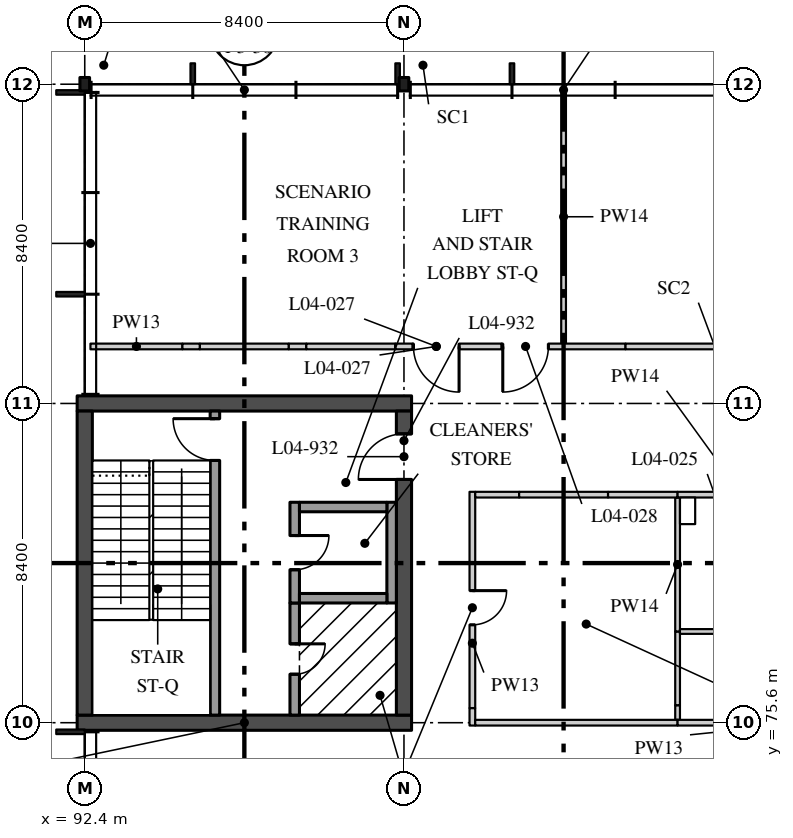
"""IFC4 building model, lengths in metres.
Left out: names, types, materials, properties, quantities, classifications, styles, units other than length and angle.
Written with IfcOpenShell. Run it as: python <this file> out.ifc"""

import sys

from ifc_helpers import new_model, si_unit, direction, frame, frame_2d, origin, origin_2d, place, context, subcontext, project, spatial, rectangle, i_section, extrude, element, fill, save


model = new_model("IFC4")
c1 = context("Model", 3, precision=1e-05, world=origin(), true_north=direction((0.0, 1.0)))
c2 = subcontext(c1, "Body", "Model", "MODEL_VIEW")
j1 = project(units=[si_unit("LENGTHUNIT", "METRE"), si_unit("PLANEANGLEUNIT", "RADIAN")], contexts=[c1])
p1 = place(None, origin())
s1 = spatial("IfcSite", under=j1, at=p1, CompositionType="ELEMENT")
p2 = place(p1, origin())
s2 = spatial("IfcBuilding", under=s1, at=p2, CompositionType="ELEMENT")
p3 = place(p2, frame((0.0, 0.0, 18.9)))
s3 = spatial("IfcBuildingStorey", under=s2, at=p3, CompositionType="ELEMENT", Elevation=18.9)
for number, where, z_axis, x_axis in (
    (1, (92.4, 92.4, 0.0), (0.0, 0.0, 1.0), (1.0, 0.0, 0.0)),
    (2, (100.8, 92.4, 0.0), (0.0, 0.0, 1.0), (1.0, 0.0, 0.0)),
):
    element("IfcColumn", number, at=place(p3, frame(where, z_axis=z_axis, x_axis=x_axis)), inside=s3, PredefinedType="COLUMN", context=c2, shape_type="SweptSolid", body=[
        extrude(i_section(OverallWidth=0.254, OverallDepth=0.353, WebThickness=0.01, FlangeThickness=0.016, FilletRadius=0.015, at=origin_2d()), origin(), (0.0, 0.0, 1.0), 4.37),
    ])
for number, where, z_axis, x_axis in (
    (3, (92.2, 75.6, 0.0), (0.0, 0.0, 1.0), (1.0, 0.0, 0.0)),
    (4, (92.2, 84.0, 0.0), (0.0, 0.0, 1.0), (1.0, 0.0, 0.0)),
):
    element("IfcWall", number, at=place(p3, frame(where, z_axis=z_axis, x_axis=x_axis)), inside=s3, PredefinedType="SHEAR", context=c2, shape_type="SweptSolid", body=[
        extrude(rectangle(XDim=8.8, YDim=0.4, at=frame_2d((4.4, 0.0))), origin(), (0.0, 0.0, 1.0), 4.37),
    ])
p4 = place(p3, frame((92.4, 75.8, 0.0), z_axis=(0.0, 0.0, 1.0), x_axis=(0.0, 1.0, 0.0)))
e5 = element("IfcWall", 5, at=p4, inside=s3, PredefinedType="SHEAR", context=c2, shape_type="SweptSolid", body=[
    extrude(rectangle(XDim=8.0, YDim=0.4, at=frame_2d((4.0, 0.0))), origin(), (0.0, 0.0, 1.0), 4.37),
])
p5 = place(p3, frame((100.8, 75.8, 0.0), z_axis=(0.0, 0.0, 1.0), x_axis=(0.0, 1.0, 0.0)))
e6 = element("IfcWall", 6, at=p5, inside=s3, PredefinedType="SHEAR", context=c2, shape_type="SweptSolid", body=[
    extrude(rectangle(XDim=8.0, YDim=0.4, at=frame_2d((4.0, 0.0))), origin(), (0.0, 0.0, 1.0), 4.37),
])
p6 = place(p5, frame((6.2, 0.0, 0.0)))
e7 = element("IfcOpeningElement", 7, at=p6, cuts=e6, PredefinedType="OPENING", context=c2, shape_type="SweptSolid", body=[
    extrude(rectangle(XDim=1.2, YDim=2.1, at=frame_2d((0.6, 1.05))), frame((0.0, 0.21, 0.0), z_axis=(0.0, -1.0, 0.0), x_axis=(1.0, 0.0, 0.0)), (0.0, 0.0, 1.0), 0.42),
])
p7 = place(p3, frame((95.825, 83.8, 0.0), z_axis=(0.0, 0.0, 1.0), x_axis=(0.0, -1.0, 0.0)))
e8 = element("IfcWall", 8, at=p7, inside=s3, PredefinedType="SOLIDWALL", context=c2, shape_type="SweptSolid", body=[
    extrude(rectangle(XDim=8.0, YDim=0.25, at=frame_2d((4.0, 0.0))), origin(), (0.0, 0.0, 1.0), 4.37),
])
p8 = place(p7, frame((0.2, 0.0, 0.0)))
e9 = element("IfcOpeningElement", 9, at=p8, cuts=e8, PredefinedType="OPENING", context=c2, shape_type="SweptSolid", body=[
    extrude(rectangle(XDim=1.1, YDim=2.1, at=frame_2d((0.55, 1.05))), frame((0.0, 0.135, 0.0), z_axis=(0.0, -1.0, 0.0), x_axis=(1.0, 0.0, 0.0)), (0.0, 0.0, 1.0), 0.27),
])
p9 = place(p3, frame((97.925, 78.75, 0.0), z_axis=(0.0, 0.0, 1.0), x_axis=(0.0, -1.0, 0.0)))
e10 = element("IfcWall", 10, at=p9, inside=s3, PredefinedType="SOLIDWALL", context=c2, shape_type="SweptSolid", body=[
    extrude(rectangle(XDim=2.95, YDim=0.25, at=frame_2d((1.475, 0.0))), origin(), (0.0, 0.0, 1.0), 4.37),
])
p10 = place(p9, frame((1.075, 0.0, 0.0)))
e11 = element("IfcOpeningElement", 11, at=p10, cuts=e10, PredefinedType="OPENING", context=c2, shape_type="SweptSolid", body=[
    extrude(rectangle(XDim=0.8, YDim=2.1, at=frame_2d((0.4, 1.05))), frame((0.0, 0.135, 0.0), z_axis=(0.0, -1.0, 0.0), x_axis=(1.0, 0.0, 0.0)), (0.0, 0.0, 1.0), 0.27),
])
p11 = place(p3, frame((97.925, 81.4, 0.0), z_axis=(0.0, 0.0, 1.0), x_axis=(0.0, -1.0, 0.0)))
e12 = element("IfcWall", 12, at=p11, inside=s3, PredefinedType="SOLIDWALL", context=c2, shape_type="SweptSolid", body=[
    extrude(rectangle(XDim=2.65, YDim=0.25, at=frame_2d((1.325, 0.0))), origin(), (0.0, 0.0, 1.0), 4.37),
])
p12 = place(p11, frame((0.875, 0.0, 0.0)))
e13 = element("IfcOpeningElement", 13, at=p12, cuts=e12, PredefinedType="OPENING", context=c2, shape_type="SweptSolid", body=[
    extrude(rectangle(XDim=0.9, YDim=2.1, at=frame_2d((0.45, 1.05))), frame((0.0, 0.135, 0.0), z_axis=(0.0, -1.0, 0.0), x_axis=(1.0, 0.0, 0.0)), (0.0, 0.0, 1.0), 0.27),
])
p13 = place(p3, frame((100.475, 81.4, 0.0), z_axis=(0.0, 0.0, 1.0), x_axis=(0.0, -1.0, 0.0)))
e14 = element("IfcWall", 14, at=p13, inside=s3, PredefinedType="SOLIDWALL", context=c2, shape_type="SweptSolid", body=[
    extrude(rectangle(XDim=2.65, YDim=0.25, at=frame_2d((1.325, 0.0))), origin(), (0.0, 0.0, 1.0), 4.37),
])
for number, where, z_axis, x_axis in (
    (15, (98.05, 81.275, 0.0), (0.0, 0.0, 1.0), (1.0, 0.0, 0.0)),
    (16, (98.05, 78.875, 0.0), (0.0, 0.0, 1.0), (1.0, 0.0, 0.0)),
):
    element("IfcWall", number, at=place(p3, frame(where, z_axis=z_axis, x_axis=x_axis)), inside=s3, PredefinedType="SOLIDWALL", context=c2, shape_type="SweptSolid", body=[
        extrude(rectangle(XDim=2.3, YDim=0.25, at=frame_2d((1.15, 0.0))), origin(), (0.0, 0.0, 1.0), 4.37),
    ])
p14 = place(p3, frame((108.0, 75.675, 0.0), z_axis=(0.0, 0.0, 1.0), x_axis=(0.0, 1.0, 0.0)))
e17 = element("IfcWall", 17, at=p14, inside=s3, PredefinedType="PARTITIONING", context=c2, shape_type="SweptSolid", body=[
    extrude(rectangle(XDim=0.385, YDim=0.125, at=frame_2d((0.192, 0.0))), origin(), (0.0, 0.0, 1.0), 3.819),
])
p15 = place(p3, frame((108.0, 76.06, 0.0), z_axis=(0.0, 0.0, 1.0), x_axis=(0.0, 1.0, 0.0)))
e18 = element("IfcWall", 18, at=p15, inside=s3, PredefinedType="PARTITIONING", context=c2, shape_type="SweptSolid", body=[
    extrude(rectangle(XDim=1.94, YDim=0.125, at=frame_2d((0.97, 0.0))), origin(), (0.0, 0.0, 1.0), 4.37),
])
p16 = place(p3, frame((108.0, 78.0, 0.0), z_axis=(0.0, 0.0, 1.0), x_axis=(0.0, 1.0, 0.0)))
e19 = element("IfcWall", 19, at=p16, inside=s3, PredefinedType="PARTITIONING", context=c2, shape_type="SweptSolid", body=[
    extrude(rectangle(XDim=3.525, YDim=0.125, at=frame_2d((1.762, 0.0))), origin(), (0.0, 0.0, 1.0), 4.37),
])
p17 = place(p3, frame((102.6, 75.525, 0.0), z_axis=(0.0, 0.0, 1.0), x_axis=(0.0, 1.0, 0.0)))
e20 = element("IfcWall", 20, at=p17, inside=s3, PredefinedType="PARTITIONING", context=c2, shape_type="SweptSolid", body=[
    extrude(rectangle(XDim=0.46, YDim=0.15, at=frame_2d((0.23, 0.0))), origin(), (0.0, 0.0, 1.0), 3.819),
])
p18 = place(p3, frame((102.6, 75.985, 0.0), z_axis=(0.0, 0.0, 1.0), x_axis=(0.0, 1.0, 0.0)))
e21 = element("IfcWall", 21, at=p18, inside=s3, PredefinedType="PARTITIONING", context=c2, shape_type="SweptSolid", body=[
    extrude(rectangle(XDim=5.69, YDim=0.15, at=frame_2d((2.845, 0.0))), origin(), (0.0, 0.0, 1.0), 4.37),
])
p19 = place(p18, frame((2.19, 0.0, 0.0)))
e22 = element("IfcOpeningElement", 22, at=p19, cuts=e21, PredefinedType="OPENING", context=c2, shape_type="SweptSolid", body=[
    extrude(rectangle(XDim=0.9, YDim=2.1, at=frame_2d((0.45, 1.05))), frame((0.0, 0.085, 0.0), z_axis=(0.0, -1.0, 0.0), x_axis=(1.0, 0.0, 0.0)), (0.0, 0.0, 1.0), 0.17),
])
p20 = place(p3, frame((102.675, 75.6, 0.0), z_axis=(0.0, 0.0, 1.0), x_axis=(1.0, 0.0, 0.0)))
e23 = element("IfcWall", 23, at=p20, inside=s3, PredefinedType="PARTITIONING", context=c2, shape_type="SweptSolid", body=[
    extrude(rectangle(XDim=5.325, YDim=0.15, at=frame_2d((2.663, 0.0))), origin(), (0.0, 0.0, 1.0), 3.819),
])
p21 = place(p3, frame((102.675, 81.6, 0.0), z_axis=(0.0, 0.0, 1.0), x_axis=(1.0, 0.0, 0.0)))
e24 = element("IfcWall", 24, at=p21, inside=s3, PredefinedType="PARTITIONING", context=c2, shape_type="SweptSolid", body=[
    extrude(rectangle(XDim=1.155, YDim=0.15, at=frame_2d((0.578, 0.0))), origin(), (0.0, 0.0, 1.0), 3.946),
])
p22 = place(p3, frame((103.83, 81.6, 0.0), z_axis=(0.0, 0.0, 1.0), x_axis=(1.0, 0.0, 0.0)))
e25 = element("IfcWall", 25, at=p22, inside=s3, PredefinedType="PARTITIONING", context=c2, shape_type="SweptSolid", body=[
    extrude(rectangle(XDim=2.34, YDim=0.15, at=frame_2d((1.17, 0.0))), origin(), (0.0, 0.0, 1.0), 4.37),
])
p23 = place(p3, frame((106.17, 81.6, 0.0), z_axis=(0.0, 0.0, 1.0), x_axis=(1.0, 0.0, 0.0)))
e26 = element("IfcWall", 26, at=p23, inside=s3, PredefinedType="PARTITIONING", context=c2, shape_type="SweptSolid", body=[
    extrude(rectangle(XDim=1.83, YDim=0.15, at=frame_2d((0.915, 0.0))), origin(), (0.0, 0.0, 1.0), 3.946),
])
p24 = place(p3, frame((108.062, 78.0, 0.0), z_axis=(0.0, 0.0, 1.0), x_axis=(1.0, 0.0, 0.0)))
e27 = element("IfcWall", 27, at=p24, inside=s3, PredefinedType="PARTITIONING", context=c2, shape_type="SweptSolid", body=[
    extrude(rectangle(XDim=1.33, YDim=0.125, at=frame_2d((0.665, 0.0))), origin(), (0.0, 0.0, 1.0), 3.819),
])
p25 = place(p3, frame((108.0, 75.6, 0.0), z_axis=(0.0, 0.0, 1.0), x_axis=(1.0, 0.0, 0.0)))
e28 = element("IfcWall", 28, at=p25, inside=s3, PredefinedType="PARTITIONING", context=c2, shape_type="SweptSolid", body=[
    extrude(rectangle(XDim=1.072, YDim=0.15, at=frame_2d((0.536, 0.0))), origin(), (0.0, 0.0, 1.0), 3.819),
])
p26 = place(p3, frame((108.0, 81.6, 0.0), z_axis=(0.0, 0.0, 1.0), x_axis=(1.0, 0.0, 0.0)))
e29 = element("IfcWall", 29, at=p26, inside=s3, PredefinedType="PARTITIONING", context=c2, shape_type="SweptSolid", body=[
    extrude(rectangle(XDim=1.43, YDim=0.15, at=frame_2d((0.715, 0.0))), origin(), (0.0, 0.0, 1.0), 3.819),
])
p27 = place(p3, frame((105.0, 85.575, 0.0), z_axis=(0.0, 0.0, 1.0), x_axis=(0.0, 1.0, 0.0)))
e30 = element("IfcWall", 30, at=p27, inside=s3, PredefinedType="PARTITIONING", context=c2, shape_type="SweptSolid", body=[
    extrude(rectangle(XDim=6.675, YDim=0.125, at=frame_2d((3.337, 0.0))), origin(), (0.0, 0.0, 1.0), 4.37),
])
p28 = place(p3, frame((92.55, 85.5, 0.0), z_axis=(0.0, 0.0, 1.0), x_axis=(1.0, 0.0, 0.0)))
e31 = element("IfcWall", 31, at=p28, inside=s3, PredefinedType="PARTITIONING", context=c2, shape_type="SweptSolid", body=[
    extrude(rectangle(XDim=2.42, YDim=0.15, at=frame_2d((1.21, 0.0))), origin(), (0.0, 0.0, 1.0), 4.37),
])
p29 = place(p3, frame((94.97, 85.5, 0.0), z_axis=(0.0, 0.0, 1.0), x_axis=(1.0, 0.0, 0.0)))
e32 = element("IfcWall", 32, at=p29, inside=s3, PredefinedType="PARTITIONING", context=c2, shape_type="SweptSolid", body=[
    extrude(rectangle(XDim=0.46, YDim=0.15, at=frame_2d((0.23, 0.0))), origin(), (0.0, 0.0, 1.0), 3.946),
])
p30 = place(p3, frame((95.43, 85.5, 0.0), z_axis=(0.0, 0.0, 1.0), x_axis=(1.0, 0.0, 0.0)))
e33 = element("IfcWall", 33, at=p30, inside=s3, PredefinedType="PARTITIONING", context=c2, shape_type="SweptSolid", body=[
    extrude(rectangle(XDim=2.34, YDim=0.15, at=frame_2d((1.17, 0.0))), origin(), (0.0, 0.0, 1.0), 4.37),
])
p31 = place(p3, frame((97.77, 85.5, 0.0), z_axis=(0.0, 0.0, 1.0), x_axis=(1.0, 0.0, 0.0)))
e34 = element("IfcWall", 34, at=p31, inside=s3, PredefinedType="PARTITIONING", context=c2, shape_type="SweptSolid", body=[
    extrude(rectangle(XDim=0.46, YDim=0.15, at=frame_2d((0.23, 0.0))), origin(), (0.0, 0.0, 1.0), 3.946),
])
p32 = place(p3, frame((98.23, 85.5, 0.0), z_axis=(0.0, 0.0, 1.0), x_axis=(1.0, 0.0, 0.0)))
e35 = element("IfcWall", 35, at=p32, inside=s3, PredefinedType="PARTITIONING", context=c2, shape_type="SweptSolid", body=[
    extrude(rectangle(XDim=2.34, YDim=0.15, at=frame_2d((1.17, 0.0))), origin(), (0.0, 0.0, 1.0), 4.37),
])
p33 = place(p3, frame((100.57, 85.5, 0.0), z_axis=(0.0, 0.0, 1.0), x_axis=(1.0, 0.0, 0.0)))
e36 = element("IfcWall", 36, at=p33, inside=s3, PredefinedType="PARTITIONING", context=c2, shape_type="SweptSolid", body=[
    extrude(rectangle(XDim=0.46, YDim=0.15, at=frame_2d((0.23, 0.0))), origin(), (0.0, 0.0, 1.0), 3.819),
])
p34 = place(p3, frame((101.03, 85.5, 0.0), z_axis=(0.0, 0.0, 1.0), x_axis=(1.0, 0.0, 0.0)))
e37 = element("IfcWall", 37, at=p34, inside=s3, PredefinedType="PARTITIONING", context=c2, shape_type="SweptSolid", body=[
    extrude(rectangle(XDim=2.34, YDim=0.15, at=frame_2d((1.17, 0.0))), origin(), (0.0, 0.0, 1.0), 4.37),
])
p35 = place(p34, frame((0.02, 0.0, 0.0)))
e38 = element("IfcOpeningElement", 38, at=p35, cuts=e37, PredefinedType="OPENING", context=c2, shape_type="SweptSolid", body=[
    extrude(rectangle(XDim=1.2, YDim=2.4, at=frame_2d((0.6, 1.2))), frame((0.0, 0.085, 0.0), z_axis=(0.0, -1.0, 0.0), x_axis=(1.0, 0.0, 0.0)), (0.0, 0.0, 1.0), 0.17),
])
p36 = place(p3, frame((103.37, 85.5, 0.0), z_axis=(0.0, 0.0, 1.0), x_axis=(1.0, 0.0, 0.0)))
e39 = element("IfcWall", 39, at=p36, inside=s3, PredefinedType="PARTITIONING", context=c2, shape_type="SweptSolid", body=[
    extrude(rectangle(XDim=1.63, YDim=0.15, at=frame_2d((0.815, 0.0))), origin(), (0.0, 0.0, 1.0), 3.946),
])
p37 = place(p36, frame((0.03, 0.0, 0.0)))
e40 = element("IfcOpeningElement", 40, at=p37, cuts=e39, PredefinedType="OPENING", context=c2, shape_type="SweptSolid", body=[
    extrude(rectangle(XDim=1.2, YDim=2.4, at=frame_2d((0.6, 1.2))), frame((0.0, 0.085, 0.0), z_axis=(0.0, -1.0, 0.0), x_axis=(1.0, 0.0, 0.0)), (0.0, 0.0, 1.0), 0.17),
])
p38 = place(p3, frame((105.0, 85.5, 0.0), z_axis=(0.0, 0.0, 1.0), x_axis=(1.0, 0.0, 0.0)))
e41 = element("IfcWall", 41, at=p38, inside=s3, PredefinedType="PARTITIONING", context=c2, shape_type="SweptSolid", body=[
    extrude(rectangle(XDim=1.63, YDim=0.15, at=frame_2d((0.815, 0.0))), origin(), (0.0, 0.0, 1.0), 3.946),
])
p39 = place(p3, frame((106.63, 85.5, 0.0), z_axis=(0.0, 0.0, 1.0), x_axis=(1.0, 0.0, 0.0)))
e42 = element("IfcWall", 42, at=p39, inside=s3, PredefinedType="PARTITIONING", context=c2, shape_type="SweptSolid", body=[
    extrude(rectangle(XDim=2.34, YDim=0.15, at=frame_2d((1.17, 0.0))), origin(), (0.0, 0.0, 1.0), 4.37),
])
p40 = place(p6, origin())
e43 = element("IfcDoor", 43, at=p40, inside=s3, OperationType="SINGLE_SWING_RIGHT", PredefinedType="DOOR", context=c2, shape_type="SweptSolid", body=[
    extrude(rectangle(XDim=1.2, YDim=2.1, at=frame_2d((0.6, 1.05))), frame((0.0, 0.035, 0.0), z_axis=(0.0, -1.0, 0.0), x_axis=(1.0, 0.0, 0.0)), (0.0, 0.0, 1.0), 0.07),
])
fill(e7, e43)
p41 = place(p12, origin())
e44 = element("IfcDoor", 44, at=p41, inside=s3, OperationType="SINGLE_SWING_RIGHT", PredefinedType="DOOR", context=c2, shape_type="SweptSolid", body=[
    extrude(rectangle(XDim=0.9, YDim=2.1, at=frame_2d((0.45, 1.05))), frame((0.0, 0.035, 0.0), z_axis=(0.0, -1.0, 0.0), x_axis=(1.0, 0.0, 0.0)), (0.0, 0.0, 1.0), 0.07),
])
fill(e13, e44)
p42 = place(p10, origin())
e45 = element("IfcDoor", 45, at=p42, inside=s3, OperationType="SINGLE_SWING_RIGHT", PredefinedType="DOOR", context=c2, shape_type="SweptSolid", body=[
    extrude(rectangle(XDim=0.8, YDim=2.1, at=frame_2d((0.4, 1.05))), frame((0.0, 0.035, 0.0), z_axis=(0.0, -1.0, 0.0), x_axis=(1.0, 0.0, 0.0)), (0.0, 0.0, 1.0), 0.07),
])
fill(e11, e45)
p43 = place(p8, frame((1.1, 0.0, 0.0), z_axis=(0.0, 0.0, 1.0), x_axis=(-1.0, 0.0, 0.0)))
e46 = element("IfcDoor", 46, at=p43, inside=s3, OperationType="SINGLE_SWING_LEFT", PredefinedType="DOOR", context=c2, shape_type="SweptSolid", body=[
    extrude(rectangle(XDim=1.1, YDim=2.1, at=frame_2d((0.55, 1.05))), frame((0.0, 0.035, 0.0), z_axis=(0.0, -1.0, 0.0), x_axis=(1.0, 0.0, 0.0)), (0.0, 0.0, 1.0), 0.07),
])
fill(e9, e46)
p44 = place(p19, frame((0.9, 0.0, 0.0), z_axis=(0.0, 0.0, 1.0), x_axis=(-1.0, 0.0, 0.0)))
e47 = element("IfcDoor", 47, at=p44, inside=s3, OperationType="SINGLE_SWING_RIGHT", PredefinedType="DOOR", context=c2, shape_type="SweptSolid", body=[
    extrude(rectangle(XDim=0.9, YDim=2.1, at=frame_2d((0.45, 1.05))), frame((0.0, 0.025, 0.0), z_axis=(0.0, -1.0, 0.0), x_axis=(1.0, 0.0, 0.0)), (0.0, 0.0, 1.0), 0.05),
])
fill(e22, e47)
p45 = place(p35, frame((1.2, 0.0, 0.0), z_axis=(0.0, 0.0, 1.0), x_axis=(-1.0, 0.0, 0.0)))
e48 = element("IfcDoor", 48, at=p45, inside=s3, OperationType="SINGLE_SWING_RIGHT", PredefinedType="DOOR", context=c2, shape_type="SweptSolid", body=[
    extrude(rectangle(XDim=1.2, YDim=2.4, at=frame_2d((0.6, 1.2))), frame((0.0, 0.025, 0.0), z_axis=(0.0, -1.0, 0.0), x_axis=(1.0, 0.0, 0.0)), (0.0, 0.0, 1.0), 0.05),
])
fill(e38, e48)
p46 = place(p37, frame((1.2, 0.0, 0.0), z_axis=(0.0, 0.0, 1.0), x_axis=(-1.0, 0.0, 0.0)))
e49 = element("IfcDoor", 49, at=p46, inside=s3, OperationType="SINGLE_SWING_LEFT", PredefinedType="DOOR", context=c2, shape_type="SweptSolid", body=[
    extrude(rectangle(XDim=1.2, YDim=2.4, at=frame_2d((0.6, 1.2))), frame((0.0, 0.025, 0.0), z_axis=(0.0, -1.0, 0.0), x_axis=(1.0, 0.0, 0.0)), (0.0, 0.0, 1.0), 0.05),
])
fill(e40, e49)
save(model, sys.argv[1])
